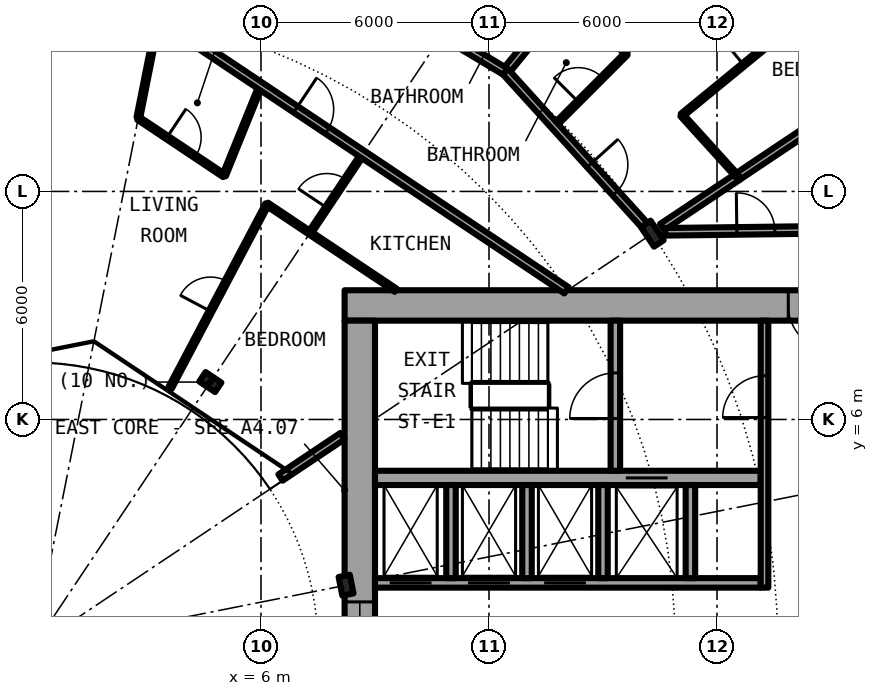
"""IFC4 building model, lengths in metres.
Left out: names, types, materials, properties, quantities, classifications, styles, units other than length and angle.
Written with IfcOpenShell. Run it as: python <this file> out.ifc"""

import sys

from ifc_helpers import new_model, si_unit, direction, frame, frame_2d, origin, origin_2d, place, context, subcontext, project, spatial, rectangle, i_section, extrude, element, fill, save


model = new_model("IFC4")
c1 = context("Model", 3, precision=1e-05, world=origin(), true_north=direction((0.0, 1.0)))
c2 = subcontext(c1, "Body", "Model", "MODEL_VIEW")
j1 = project(units=[si_unit("LENGTHUNIT", "METRE"), si_unit("PLANEANGLEUNIT", "RADIAN")], contexts=[c1])
p1 = place(None, origin())
s1 = spatial("IfcSite", under=j1, at=p1, CompositionType="ELEMENT")
p2 = place(p1, origin())
s2 = spatial("IfcBuilding", under=s1, at=p2, CompositionType="ELEMENT")
p3 = place(p2, frame((0.0, 0.0, 31.95)))
s3 = spatial("IfcBuildingStorey", under=s2, at=p3, CompositionType="ELEMENT", Elevation=31.95)
p4 = place(p3, frame((16.297, 10.889, 0.0), z_axis=(0.0, 0.0, 1.0), x_axis=(0.831469612303, 0.55557023302, 0.0)))
e1 = element("IfcColumn", 1, at=p4, inside=s3, PredefinedType="COLUMN", context=c2, shape_type="SweptSolid", body=[
    extrude(i_section(OverallWidth=0.305, OverallDepth=0.62, WebThickness=0.021, FlangeThickness=0.04, FilletRadius=0.027, at=origin_2d()), origin(), (0.0, 0.0, 1.0), 3.05),
])
for number, where, z_axis, x_axis in (
    (2, (8.239, 1.639, 0.0), (0.0, 0.0, 1.0), (0.981, 0.195, 0.0)),
    (3, (4.667, 6.984, 0.0), (0.0, 0.0, 1.0), (0.556, 0.831, 0.0)),
):
    element("IfcColumn", number, at=place(p3, frame(where, z_axis=z_axis, x_axis=x_axis)), inside=s3, PredefinedType="COLUMN", context=c2, shape_type="SweptSolid", body=[
        extrude(i_section(OverallWidth=0.3, OverallDepth=0.5, WebThickness=0.014, FlangeThickness=0.028, FilletRadius=0.027, at=origin_2d()), origin(), (0.0, 0.0, 1.0), 3.05),
    ])
p5 = place(p3, frame((22.699, 15.167, 0.0), z_axis=(0.0, 0.0, 1.0), x_axis=(-0.634382322723, 0.773019449054, 0.0)))
e4 = element("IfcWall", 4, at=p5, inside=s3, PredefinedType="SOLIDWALL", context=c2, shape_type="SweptSolid", body=[
    extrude(rectangle(XDim=5.352, YDim=0.25, at=frame_2d((2.676, 0.0))), origin(), (0.0, 0.0, 1.0), 2.7),
])
p6 = place(p5, frame((0.841, 0.0, 0.0)))
e5 = element("IfcOpeningElement", 5, at=p6, cuts=e4, PredefinedType="OPENING", context=c2, shape_type="SweptSolid", body=[
    extrude(rectangle(XDim=1.0, YDim=2.2, at=frame_2d((0.5, 1.1))), frame((0.0, 0.135, 0.0), z_axis=(0.0, -1.0, 0.0), x_axis=(1.0, 0.0, 0.0)), (0.0, 0.0, 1.0), 0.27),
])
p7 = place(p5, frame((3.111, 0.0, 0.3)))
e6 = element("IfcOpeningElement", 6, at=p7, cuts=e4, PredefinedType="OPENING", context=c2, shape_type="SweptSolid", body=[
    extrude(rectangle(XDim=1.8, YDim=2.1, at=frame_2d((0.9, 1.05))), frame((0.0, 0.135, 0.0), z_axis=(0.0, -1.0, 0.0), x_axis=(1.0, 0.0, 0.0)), (0.0, 0.0, 1.0), 0.27),
])
p8 = place(p3, frame((22.4, 9.0, 0.0), z_axis=(0.0, 0.0, 1.0), x_axis=(-1.0, 0.0, 0.0)))
e7 = element("IfcWall", 7, at=p8, inside=s3, PredefinedType="SHEAR", context=c2, shape_type="SweptSolid", body=[
    extrude(rectangle(XDim=14.2, YDim=0.8, at=frame_2d((7.1, 0.0))), origin(), (0.0, 0.0, 1.0), 3.05),
])
p9 = place(p8, frame((1.325, 0.0, 0.0)))
e8 = element("IfcOpeningElement", 8, at=p9, cuts=e7, PredefinedType="OPENING", context=c2, shape_type="SweptSolid", body=[
    extrude(rectangle(XDim=1.2, YDim=2.3, at=frame_2d((0.6, 1.15))), frame((0.0, 0.41, 0.0), z_axis=(0.0, -1.0, 0.0), x_axis=(1.0, 0.0, 0.0)), (0.0, 0.0, 1.0), 0.82),
])
p10 = place(p3, frame((8.6, -8.6, 0.0), z_axis=(0.0, 0.0, 1.0), x_axis=(0.0, 1.0, 0.0)))
e9 = element("IfcWall", 9, at=p10, inside=s3, PredefinedType="SHEAR", context=c2, shape_type="SweptSolid", body=[
    extrude(rectangle(XDim=17.2, YDim=0.8, at=frame_2d((8.6, 0.0))), origin(), (0.0, 0.0, 1.0), 3.05),
])
p11 = place(p10, frame((7.4, 0.0, 0.1)))
e10 = element("IfcOpeningElement", 10, at=p11, cuts=e9, PredefinedType="OPENING", context=c2, shape_type="SweptSolid", body=[
    extrude(rectangle(XDim=2.4, YDim=2.2, at=frame_2d((1.2, 1.1))), frame((0.0, 0.41, 0.0), z_axis=(0.0, -1.0, 0.0), x_axis=(1.0, 0.0, 0.0)), (0.0, 0.0, 1.0), 0.82),
])
p12 = place(p3, frame((9.0, 1.7, 0.0), z_axis=(0.0, 0.0, 1.0), x_axis=(1.0, 0.0, 0.0)))
e11 = element("IfcWall", 11, at=p12, inside=s3, PredefinedType="SHEAR", context=c2, shape_type="SweptSolid", body=[
    extrude(rectangle(XDim=10.15, YDim=0.25, at=frame_2d((5.075, 0.0))), origin(), (0.0, 0.0, 1.0), 3.05),
])
p13 = place(p12, frame((0.387, 0.0, 0.0)))
e12 = element("IfcOpeningElement", 12, at=p13, cuts=e11, PredefinedType="OPENING", context=c2, shape_type="SweptSolid", body=[
    extrude(rectangle(XDim=1.1, YDim=2.3, at=frame_2d((0.55, 1.15))), frame((0.0, 0.135, 0.0), z_axis=(0.0, -1.0, 0.0), x_axis=(1.0, 0.0, 0.0)), (0.0, 0.0, 1.0), 0.27),
])
p14 = place(p12, frame((2.45, 0.0, 0.0)))
e13 = element("IfcOpeningElement", 13, at=p14, cuts=e11, PredefinedType="OPENING", context=c2, shape_type="SweptSolid", body=[
    extrude(rectangle(XDim=1.1, YDim=2.3, at=frame_2d((0.55, 1.15))), frame((0.0, 0.135, 0.0), z_axis=(0.0, -1.0, 0.0), x_axis=(1.0, 0.0, 0.0)), (0.0, 0.0, 1.0), 0.27),
])
p15 = place(p12, frame((4.45, 0.0, 0.0)))
e14 = element("IfcOpeningElement", 14, at=p15, cuts=e11, PredefinedType="OPENING", context=c2, shape_type="SweptSolid", body=[
    extrude(rectangle(XDim=1.1, YDim=2.3, at=frame_2d((0.55, 1.15))), frame((0.0, 0.135, 0.0), z_axis=(0.0, -1.0, 0.0), x_axis=(1.0, 0.0, 0.0)), (0.0, 0.0, 1.0), 0.27),
])
p16 = place(p3, frame((9.0, 4.462, 0.0), z_axis=(0.0, 0.0, 1.0), x_axis=(1.0, 0.0, 0.0)))
e15 = element("IfcWall", 15, at=p16, inside=s3, PredefinedType="SHEAR", context=c2, shape_type="SweptSolid", body=[
    extrude(rectangle(XDim=10.15, YDim=0.375, at=frame_2d((5.075, 0.0))), origin(), (0.0, 0.0, 1.0), 3.05),
])
p17 = place(p16, frame((6.6, 0.0, 0.0)))
e16 = element("IfcOpeningElement", 16, at=p17, cuts=e15, PredefinedType="OPENING", context=c2, shape_type="SweptSolid", body=[
    extrude(rectangle(XDim=1.1, YDim=2.3, at=frame_2d((0.55, 1.15))), frame((0.0, 0.198, 0.0), z_axis=(0.0, -1.0, 0.0), x_axis=(1.0, 0.0, 0.0)), (0.0, 0.0, 1.0), 0.395),
])
p18 = place(p3, frame((15.325, 4.65, 0.0), z_axis=(0.0, 0.0, 1.0), x_axis=(0.0, 1.0, 0.0)))
e17 = element("IfcWall", 17, at=p18, inside=s3, PredefinedType="SHEAR", context=c2, shape_type="SweptSolid", body=[
    extrude(rectangle(XDim=3.95, YDim=0.25, at=frame_2d((1.975, 0.0))), origin(), (0.0, 0.0, 1.0), 3.05),
])
p19 = place(p18, frame((1.375, 0.0, 0.0)))
e18 = element("IfcOpeningElement", 18, at=p19, cuts=e17, PredefinedType="OPENING", context=c2, shape_type="SweptSolid", body=[
    extrude(rectangle(XDim=1.2, YDim=2.3, at=frame_2d((0.6, 1.15))), frame((0.0, 0.135, 0.0), z_axis=(0.0, -1.0, 0.0), x_axis=(1.0, 0.0, 0.0)), (0.0, 0.0, 1.0), 0.27),
])
for number, where, z_axis, x_axis in (
    (19, (15.0, 1.825, 0.0), (0.0, 0.0, 1.0), (0.0, 1.0, 0.0)),
    (20, (17.3, 1.825, 0.0), (0.0, 0.0, 1.0), (0.0, 1.0, 0.0)),
):
    element("IfcWall", number, at=place(p3, frame(where, z_axis=z_axis, x_axis=x_axis)), inside=s3, PredefinedType="SOLIDWALL", context=c2, shape_type="SweptSolid", body=[
        extrude(rectangle(XDim=2.45, YDim=0.25, at=frame_2d((1.225, 0.0))), origin(), (0.0, 0.0, 1.0), 2.7),
    ])
p20 = place(p3, frame((19.25, 1.575, 0.0), z_axis=(0.0, 0.0, 1.0), x_axis=(0.0, 1.0, 0.0)))
e21 = element("IfcWall", 21, at=p20, inside=s3, PredefinedType="SOLIDWALL", context=c2, shape_type="SweptSolid", body=[
    extrude(rectangle(XDim=7.025, YDim=0.2, at=frame_2d((3.513, 0.0))), origin(), (0.0, 0.0, 1.0), 2.7),
])
p21 = place(p20, frame((4.475, 0.0, 0.0)))
e22 = element("IfcOpeningElement", 22, at=p21, cuts=e21, PredefinedType="OPENING", context=c2, shape_type="SweptSolid", body=[
    extrude(rectangle(XDim=1.1, YDim=2.3, at=frame_2d((0.55, 1.15))), frame((0.0, 0.11, 0.0), z_axis=(0.0, -1.0, 0.0), x_axis=(1.0, 0.0, 0.0)), (0.0, 0.0, 1.0), 0.22),
])
for number, where, z_axis, x_axis in (
    (23, (11.0, 1.825, 0.0), (0.0, 0.0, 1.0), (0.0, 1.0, 0.0)),
    (24, (13.0, 1.825, 0.0), (0.0, 0.0, 1.0), (0.0, 1.0, 0.0)),
):
    element("IfcWall", number, at=place(p3, frame(where, z_axis=z_axis, x_axis=x_axis)), inside=s3, PredefinedType="SOLIDWALL", context=c2, shape_type="SweptSolid", body=[
        extrude(rectangle(XDim=2.45, YDim=0.25, at=frame_2d((1.225, 0.0))), origin(), (0.0, 0.0, 1.0), 2.7),
    ])
p22 = place(p3, frame((3.606, 6.827, 0.0), z_axis=(0.0, 0.0, 1.0), x_axis=(0.466976820365, 0.884269556889, 0.0)))
e25 = element("IfcWall", 25, at=p22, inside=s3, PredefinedType="PARTITIONING", context=c2, shape_type="SweptSolid", body=[
    extrude(rectangle(XDim=5.469, YDim=0.1, at=frame_2d((2.735, 0.0))), origin(), (0.0, 0.0, 1.0), 2.7),
])
p23 = place(p22, frame((2.284, 0.0, 0.0)))
e26 = element("IfcOpeningElement", 26, at=p23, cuts=e25, PredefinedType="OPENING", context=c2, shape_type="SweptSolid", body=[
    extrude(rectangle(XDim=0.9, YDim=2.3, at=frame_2d((0.45, 1.15))), frame((0.0, 0.06, 0.0), z_axis=(0.0, -1.0, 0.0), x_axis=(1.0, 0.0, 0.0)), (0.0, 0.0, 1.0), 0.12),
])
p24 = place(p3, frame((5.029, 12.418, 0.0), z_axis=(0.0, 0.0, 1.0), x_axis=(0.375649498413, 0.926761811008, 0.0)))
e27 = element("IfcWall", 27, at=p24, inside=s3, PredefinedType="PARTITIONING", context=c2, shape_type="SweptSolid", body=[
    extrude(rectangle(XDim=2.548, YDim=0.1, at=frame_2d((1.274, 0.0))), origin(), (0.0, 0.0, 1.0), 2.7),
])
p25 = place(p3, frame((7.289, 10.908, 0.0), z_axis=(0.0, 0.0, 1.0), x_axis=(0.555355163998, 0.831613276602, 0.0)))
e28 = element("IfcWall", 28, at=p25, inside=s3, PredefinedType="PARTITIONING", context=c2, shape_type="SweptSolid", body=[
    extrude(rectangle(XDim=2.494, YDim=0.1, at=frame_2d((1.247, 0.0))), origin(), (0.0, 0.0, 1.0), 2.7),
])
p26 = place(p25, frame((0.797, 0.0, 0.0)))
e29 = element("IfcOpeningElement", 29, at=p26, cuts=e28, PredefinedType="OPENING", context=c2, shape_type="SweptSolid", body=[
    extrude(rectangle(XDim=0.9, YDim=2.3, at=frame_2d((0.45, 1.15))), frame((0.0, 0.06, 0.0), z_axis=(0.0, -1.0, 0.0), x_axis=(1.0, 0.0, 0.0)), (0.0, 0.0, 1.0), 0.12),
])
p27 = place(p3, frame((12.434, 15.151, 0.0), z_axis=(0.0, 0.0, 1.0), x_axis=(0.634381303318, 0.773020285633, 0.0)))
e30 = element("IfcWall", 30, at=p27, inside=s3, PredefinedType="PARTITIONING", context=c2, shape_type="SweptSolid", body=[
    extrude(rectangle(XDim=7.576, YDim=0.2, at=frame_2d((3.788, 0.0))), origin(), (0.0, 0.0, 1.0), 2.7),
])
p28 = place(p3, frame((13.722, 13.73, 0.0), z_axis=(0.0, 0.0, 1.0), x_axis=(0.706741540154, 0.707471833659, 0.0)))
e31 = element("IfcWall", 31, at=p28, inside=s3, PredefinedType="PARTITIONING", context=c2, shape_type="SweptSolid", body=[
    extrude(rectangle(XDim=2.674, YDim=0.1, at=frame_2d((1.337, 0.0))), origin(), (0.0, 0.0, 1.0), 2.7),
])
p29 = place(p28, frame((0.887, 0.0, 0.0)))
e32 = element("IfcOpeningElement", 32, at=p29, cuts=e31, PredefinedType="OPENING", context=c2, shape_type="SweptSolid", body=[
    extrude(rectangle(XDim=0.9, YDim=2.3, at=frame_2d((0.45, 1.15))), frame((0.0, 0.06, 0.0), z_axis=(0.0, -1.0, 0.0), x_axis=(1.0, 0.0, 0.0)), (0.0, 0.0, 1.0), 0.12),
])
p30 = place(p3, frame((17.077, 14.006, 0.0), z_axis=(0.0, 0.0, 1.0), x_axis=(0.77326214499, 0.634086472908, 0.0)))
e33 = element("IfcWall", 33, at=p30, inside=s3, PredefinedType="PARTITIONING", context=c2, shape_type="SweptSolid", body=[
    extrude(rectangle(XDim=5.089, YDim=0.1, at=frame_2d((2.544, 0.0))), origin(), (0.0, 0.0, 1.0), 2.7),
])
p31 = place(p30, frame((2.094, 0.0, 0.0)))
e34 = element("IfcOpeningElement", 34, at=p31, cuts=e33, PredefinedType="OPENING", context=c2, shape_type="SweptSolid", body=[
    extrude(rectangle(XDim=0.9, YDim=2.3, at=frame_2d((0.45, 1.15))), frame((0.0, 0.06, 0.0), z_axis=(0.0, -1.0, 0.0), x_axis=(1.0, 0.0, 0.0)), (0.0, 0.0, 1.0), 0.12),
])
p32 = place(p3, frame((18.542, 12.389, 0.0), z_axis=(0.0, 0.0, 1.0), x_axis=(0.831387096605, 0.55569370664, 0.0)))
e35 = element("IfcWall", 35, at=p32, inside=s3, PredefinedType="PARTITIONING", context=c2, shape_type="SweptSolid", body=[
    extrude(rectangle(XDim=4.875, YDim=0.2, at=frame_2d((2.438, 0.0))), origin(), (0.0, 0.0, 1.0), 2.7),
])
p33 = place(p3, frame((16.555, 11.061, 0.0), z_axis=(0.0, 0.0, 1.0), x_axis=(0.832066006555, 0.554676627176, 0.0)))
e36 = element("IfcWall", 36, at=p33, inside=s3, PredefinedType="PARTITIONING", context=c2, shape_type="SweptSolid", body=[
    extrude(rectangle(XDim=2.39, YDim=0.2, at=frame_2d((1.195, 0.0))), origin(), (0.0, 0.0, 1.0), 2.7),
])
p34 = place(p3, frame((6.513, 4.472, 0.0), z_axis=(0.0, 0.0, 1.0), x_axis=(0.831417956244, 0.555647533996, 0.0)))
e37 = element("IfcWall", 37, at=p34, inside=s3, PredefinedType="PARTITIONING", context=c2, shape_type="SweptSolid", body=[
    extrude(rectangle(XDim=1.962, YDim=0.2, at=frame_2d((0.981, 0.0))), origin(), (0.0, 0.0, 1.0), 2.7),
])
p35 = place(p3, frame((16.637, 10.938, 0.0), z_axis=(0.0, 0.0, 1.0), x_axis=(0.99992425795, 0.012307654658, 0.0)))
e38 = element("IfcWall", 38, at=p35, inside=s3, PredefinedType="PARTITIONING", context=c2, shape_type="SweptSolid", body=[
    extrude(rectangle(XDim=5.039, YDim=0.2, at=frame_2d((2.519, 0.0))), origin(), (0.0, 0.0, 1.0), 2.7),
])
p36 = place(p35, frame((1.884, 0.0, 0.0)))
e39 = element("IfcOpeningElement", 39, at=p36, cuts=e38, PredefinedType="OPENING", context=c2, shape_type="SweptSolid", body=[
    extrude(rectangle(XDim=1.0, YDim=2.3, at=frame_2d((0.5, 1.15))), frame((0.0, 0.11, 0.0), z_axis=(0.0, -1.0, 0.0), x_axis=(1.0, 0.0, 0.0)), (0.0, 0.0, 1.0), 0.22),
])
p37 = place(p3, frame((2.771, 13.926, 0.0), z_axis=(0.0, 0.0, 1.0), x_axis=(0.831538390496, -0.555467285384, 0.0)))
e40 = element("IfcWall", 40, at=p37, inside=s3, PredefinedType="PARTITIONING", context=c2, shape_type="SweptSolid", body=[
    extrude(rectangle(XDim=2.717, YDim=0.1, at=frame_2d((1.358, 0.0))), origin(), (0.0, 0.0, 1.0), 2.7),
])
p38 = place(p37, frame((0.907, 0.0, 0.0)))
e41 = element("IfcOpeningElement", 41, at=p38, cuts=e40, PredefinedType="OPENING", context=c2, shape_type="SweptSolid", body=[
    extrude(rectangle(XDim=0.9, YDim=2.3, at=frame_2d((0.45, 1.15))), frame((0.0, 0.06, 0.0), z_axis=(0.0, -1.0, 0.0), x_axis=(1.0, 0.0, 0.0)), (0.0, 0.0, 1.0), 0.12),
])
p39 = place(p3, frame((6.159, 11.663, 0.0), z_axis=(0.0, 0.0, 1.0), x_axis=(0.831459707426, -0.555585056429, 0.0)))
e42 = element("IfcWall", 42, at=p39, inside=s3, PredefinedType="PARTITIONING", context=c2, shape_type="SweptSolid", body=[
    extrude(rectangle(XDim=4.073, YDim=0.1, at=frame_2d((2.037, 0.0))), origin(), (0.0, 0.0, 1.0), 2.7),
])
p40 = place(p3, frame((3.299, 16.574, 0.0), z_axis=(0.0, 0.0, 1.0), x_axis=(0.831465254975, -0.555576754166, 0.0)))
e43 = element("IfcWall", 43, at=p40, inside=s3, PredefinedType="PARTITIONING", context=c2, shape_type="SweptSolid", body=[
    extrude(rectangle(XDim=12.915, YDim=0.2, at=frame_2d((6.457, 0.0))), origin(), (0.0, 0.0, 1.0), 2.7),
])
p41 = place(p40, frame((4.346, 0.0, 0.0)))
e44 = element("IfcOpeningElement", 44, at=p41, cuts=e43, PredefinedType="OPENING", context=c2, shape_type="SweptSolid", body=[
    extrude(rectangle(XDim=1.0, YDim=2.3, at=frame_2d((0.5, 1.15))), frame((0.0, 0.11, 0.0), z_axis=(0.0, -1.0, 0.0), x_axis=(1.0, 0.0, 0.0)), (0.0, 0.0, 1.0), 0.22),
])
p42 = place(p3, frame((10.915, 16.061, 0.0), z_axis=(0.0, 0.0, 1.0), x_axis=(0.857809047014, -0.513968519329, 0.0)))
e45 = element("IfcWall", 45, at=p42, inside=s3, PredefinedType="PARTITIONING", context=c2, shape_type="SweptSolid", body=[
    extrude(rectangle(XDim=1.771, YDim=0.2, at=frame_2d((0.885, 0.0))), origin(), (0.0, 0.0, 1.0), 2.38),
])
p43 = place(p3, frame((12.434, 15.151, 0.0), z_axis=(0.0, 0.0, 1.0), x_axis=(0.671514934772, -0.740991020444, 0.0)))
e46 = element("IfcWall", 46, at=p43, inside=s3, PredefinedType="PARTITIONING", context=c2, shape_type="SweptSolid", body=[
    extrude(rectangle(XDim=5.598, YDim=0.2, at=frame_2d((2.799, 0.0))), origin(), (0.0, 0.0, 1.0), 2.38),
])
p44 = place(p43, frame((3.305, 0.0, 0.0)))
e47 = element("IfcOpeningElement", 47, at=p44, cuts=e46, PredefinedType="OPENING", context=c2, shape_type="SweptSolid", body=[
    extrude(rectangle(XDim=1.0, YDim=2.3, at=frame_2d((0.5, 1.15))), frame((0.0, 0.11, 0.0), z_axis=(0.0, -1.0, 0.0), x_axis=(1.0, 0.0, 0.0)), (0.0, 0.0, 1.0), 0.22),
])
p45 = place(p3, frame((14.147, 17.238, 0.0), z_axis=(0.0, 0.0, 1.0), x_axis=(0.671674967707, -0.740845960882, 0.0)))
e48 = element("IfcWall", 48, at=p45, inside=s3, PredefinedType="PARTITIONING", context=c2, shape_type="SweptSolid", body=[
    extrude(rectangle(XDim=2.181, YDim=0.1, at=frame_2d((1.091, 0.0))), origin(), (0.0, 0.0, 1.0), 2.7),
])
p46 = place(p3, frame((17.072, 14.011, 0.0), z_axis=(0.0, 0.0, 1.0), x_axis=(0.67169789574, -0.740825172937, 0.0)))
e49 = element("IfcWall", 49, at=p46, inside=s3, PredefinedType="PARTITIONING", context=c2, shape_type="SweptSolid", body=[
    extrude(rectangle(XDim=2.183, YDim=0.1, at=frame_2d((1.091, 0.0))), origin(), (0.0, 0.0, 1.0), 2.7),
])
p47 = place(p3, frame((2.774, 13.948, 0.0), z_axis=(0.0, 0.0, 1.0), x_axis=(0.195338620417, 0.980735858105, 0.0)))
e50 = element("IfcWall", 50, at=p47, inside=s3, PredefinedType="PARTITIONING", context=c2, shape_type="SweptSolid", body=[
    extrude(rectangle(XDim=2.657, YDim=0.1, at=frame_2d((1.329, 0.0))), origin(), (0.0, 0.0, 1.0), 2.7),
])
p48 = place(p13, origin())
e51 = element("IfcDoor", 51, at=p48, inside=s3, OperationType="DOUBLE_DOOR_SLIDING", PredefinedType="DOOR", context=c2, shape_type="SweptSolid", body=[
    extrude(rectangle(XDim=1.1, YDim=2.3, at=frame_2d((0.55, 1.15))), frame((0.0, 0.025, 0.0), z_axis=(0.0, -1.0, 0.0), x_axis=(1.0, 0.0, 0.0)), (0.0, 0.0, 1.0), 0.05),
])
fill(e12, e51)
p49 = place(p14, origin())
e52 = element("IfcDoor", 52, at=p49, inside=s3, OperationType="DOUBLE_DOOR_SLIDING", PredefinedType="DOOR", context=c2, shape_type="SweptSolid", body=[
    extrude(rectangle(XDim=1.1, YDim=2.3, at=frame_2d((0.55, 1.15))), frame((0.0, 0.025, 0.0), z_axis=(0.0, -1.0, 0.0), x_axis=(1.0, 0.0, 0.0)), (0.0, 0.0, 1.0), 0.05),
])
fill(e13, e52)
p50 = place(p15, origin())
e53 = element("IfcDoor", 53, at=p50, inside=s3, OperationType="DOUBLE_DOOR_SLIDING", PredefinedType="DOOR", context=c2, shape_type="SweptSolid", body=[
    extrude(rectangle(XDim=1.1, YDim=2.3, at=frame_2d((0.55, 1.15))), frame((0.0, 0.025, 0.0), z_axis=(0.0, -1.0, 0.0), x_axis=(1.0, 0.0, 0.0)), (0.0, 0.0, 1.0), 0.05),
])
fill(e14, e53)
p51 = place(p17, origin())
e54 = element("IfcDoor", 54, at=p51, inside=s3, OperationType="DOUBLE_DOOR_SLIDING", PredefinedType="DOOR", context=c2, shape_type="SweptSolid", body=[
    extrude(rectangle(XDim=1.1, YDim=2.3, at=frame_2d((0.55, 1.15))), frame((0.0, 0.025, 0.0), z_axis=(0.0, -1.0, 0.0), x_axis=(1.0, 0.0, 0.0)), (0.0, 0.0, 1.0), 0.05),
])
fill(e16, e54)
p52 = place(p19, origin())
e55 = element("IfcDoor", 55, at=p52, inside=s3, OperationType="SINGLE_SWING_LEFT", PredefinedType="DOOR", context=c2, shape_type="SweptSolid", body=[
    extrude(rectangle(XDim=1.2, YDim=2.3, at=frame_2d((0.6, 1.15))), frame((0.0, 0.025, 0.0), z_axis=(0.0, -1.0, 0.0), x_axis=(1.0, 0.0, 0.0)), (0.0, 0.0, 1.0), 0.05),
])
fill(e18, e55)
p53 = place(p21, origin())
e56 = element("IfcDoor", 56, at=p53, inside=s3, OperationType="SINGLE_SWING_LEFT", PredefinedType="DOOR", context=c2, shape_type="SweptSolid", body=[
    extrude(rectangle(XDim=1.1, YDim=2.3, at=frame_2d((0.55, 1.15))), frame((0.0, 0.025, 0.0), z_axis=(0.0, -1.0, 0.0), x_axis=(1.0, 0.0, 0.0)), (0.0, 0.0, 1.0), 0.05),
])
fill(e22, e56)
p54 = place(p9, origin())
e57 = element("IfcDoor", 57, at=p54, inside=s3, OperationType="SINGLE_SWING_RIGHT", PredefinedType="DOOR", context=c2, shape_type="SweptSolid", body=[
    extrude(rectangle(XDim=1.2, YDim=2.3, at=frame_2d((0.6, 1.15))), frame((0.0, 0.025, 0.0), z_axis=(0.0, -1.0, 0.0), x_axis=(1.0, 0.0, 0.0)), (0.0, 0.0, 1.0), 0.05),
])
fill(e8, e57)
p55 = place(p11, origin())
e58 = element("IfcWindow", 58, at=p55, inside=s3, PartitioningType="SINGLE_PANEL", PredefinedType="WINDOW", context=c2, shape_type="SweptSolid", body=[
    extrude(rectangle(XDim=2.4, YDim=2.2, at=frame_2d((1.2, 1.1))), frame((0.0, 0.03, 0.0), z_axis=(0.0, -1.0, 0.0), x_axis=(1.0, 0.0, 0.0)), (0.0, 0.0, 1.0), 0.06),
])
fill(e10, e58)
p56 = place(p44, origin())
e59 = element("IfcDoor", 59, at=p56, inside=s3, OperationType="SINGLE_SWING_RIGHT", PredefinedType="DOOR", context=c2, shape_type="SweptSolid", body=[
    extrude(rectangle(XDim=1.0, YDim=2.3, at=frame_2d((0.5, 1.15))), frame((0.0, 0.025, 0.0), z_axis=(0.0, -1.0, 0.0), x_axis=(1.0, 0.0, 0.0)), (0.0, 0.0, 1.0), 0.05),
])
fill(e47, e59)
p57 = place(p29, origin())
e60 = element("IfcDoor", 60, at=p57, inside=s3, OperationType="SINGLE_SWING_RIGHT", PredefinedType="DOOR", context=c2, shape_type="SweptSolid", body=[
    extrude(rectangle(XDim=0.9, YDim=2.3, at=frame_2d((0.45, 1.15))), frame((0.0, 0.025, 0.0), z_axis=(0.0, -1.0, 0.0), x_axis=(1.0, 0.0, 0.0)), (0.0, 0.0, 1.0), 0.05),
])
fill(e32, e60)
p58 = place(p31, origin())
e61 = element("IfcDoor", 61, at=p58, inside=s3, OperationType="SINGLE_SWING_RIGHT", PredefinedType="DOOR", context=c2, shape_type="SweptSolid", body=[
    extrude(rectangle(XDim=0.9, YDim=2.3, at=frame_2d((0.45, 1.15))), frame((0.0, 0.025, 0.0), z_axis=(0.0, -1.0, 0.0), x_axis=(1.0, 0.0, 0.0)), (0.0, 0.0, 1.0), 0.05),
])
fill(e34, e61)
p59 = place(p41, origin())
e62 = element("IfcDoor", 62, at=p59, inside=s3, OperationType="SINGLE_SWING_LEFT", PredefinedType="DOOR", context=c2, shape_type="SweptSolid", body=[
    extrude(rectangle(XDim=1.0, YDim=2.3, at=frame_2d((0.5, 1.15))), frame((0.0, 0.025, 0.0), z_axis=(0.0, -1.0, 0.0), x_axis=(1.0, 0.0, 0.0)), (0.0, 0.0, 1.0), 0.05),
])
fill(e44, e62)
p60 = place(p38, origin())
e63 = element("IfcDoor", 63, at=p60, inside=s3, OperationType="SINGLE_SWING_LEFT", PredefinedType="DOOR", context=c2, shape_type="SweptSolid", body=[
    extrude(rectangle(XDim=0.9, YDim=2.3, at=frame_2d((0.45, 1.15))), frame((0.0, 0.025, 0.0), z_axis=(0.0, -1.0, 0.0), x_axis=(1.0, 0.0, 0.0)), (0.0, 0.0, 1.0), 0.05),
])
fill(e41, e63)
p61 = place(p26, origin())
e64 = element("IfcDoor", 64, at=p61, inside=s3, OperationType="SINGLE_SWING_RIGHT", PredefinedType="DOOR", context=c2, shape_type="SweptSolid", body=[
    extrude(rectangle(XDim=0.9, YDim=2.3, at=frame_2d((0.45, 1.15))), frame((0.0, 0.025, 0.0), z_axis=(0.0, -1.0, 0.0), x_axis=(1.0, 0.0, 0.0)), (0.0, 0.0, 1.0), 0.05),
])
fill(e29, e64)
p62 = place(p23, origin())
e65 = element("IfcDoor", 65, at=p62, inside=s3, OperationType="SINGLE_SWING_LEFT", PredefinedType="DOOR", context=c2, shape_type="SweptSolid", body=[
    extrude(rectangle(XDim=0.9, YDim=2.3, at=frame_2d((0.45, 1.15))), frame((0.0, 0.025, 0.0), z_axis=(0.0, -1.0, 0.0), x_axis=(1.0, 0.0, 0.0)), (0.0, 0.0, 1.0), 0.05),
])
fill(e26, e65)
p63 = place(p36, origin())
e66 = element("IfcDoor", 66, at=p63, inside=s3, OperationType="SINGLE_SWING_LEFT", PredefinedType="DOOR", context=c2, shape_type="SweptSolid", body=[
    extrude(rectangle(XDim=1.0, YDim=2.3, at=frame_2d((0.5, 1.15))), frame((0.0, 0.025, 0.0), z_axis=(0.0, -1.0, 0.0), x_axis=(1.0, 0.0, 0.0)), (0.0, 0.0, 1.0), 0.05),
])
fill(e39, e66)
save(model, sys.argv[1])
